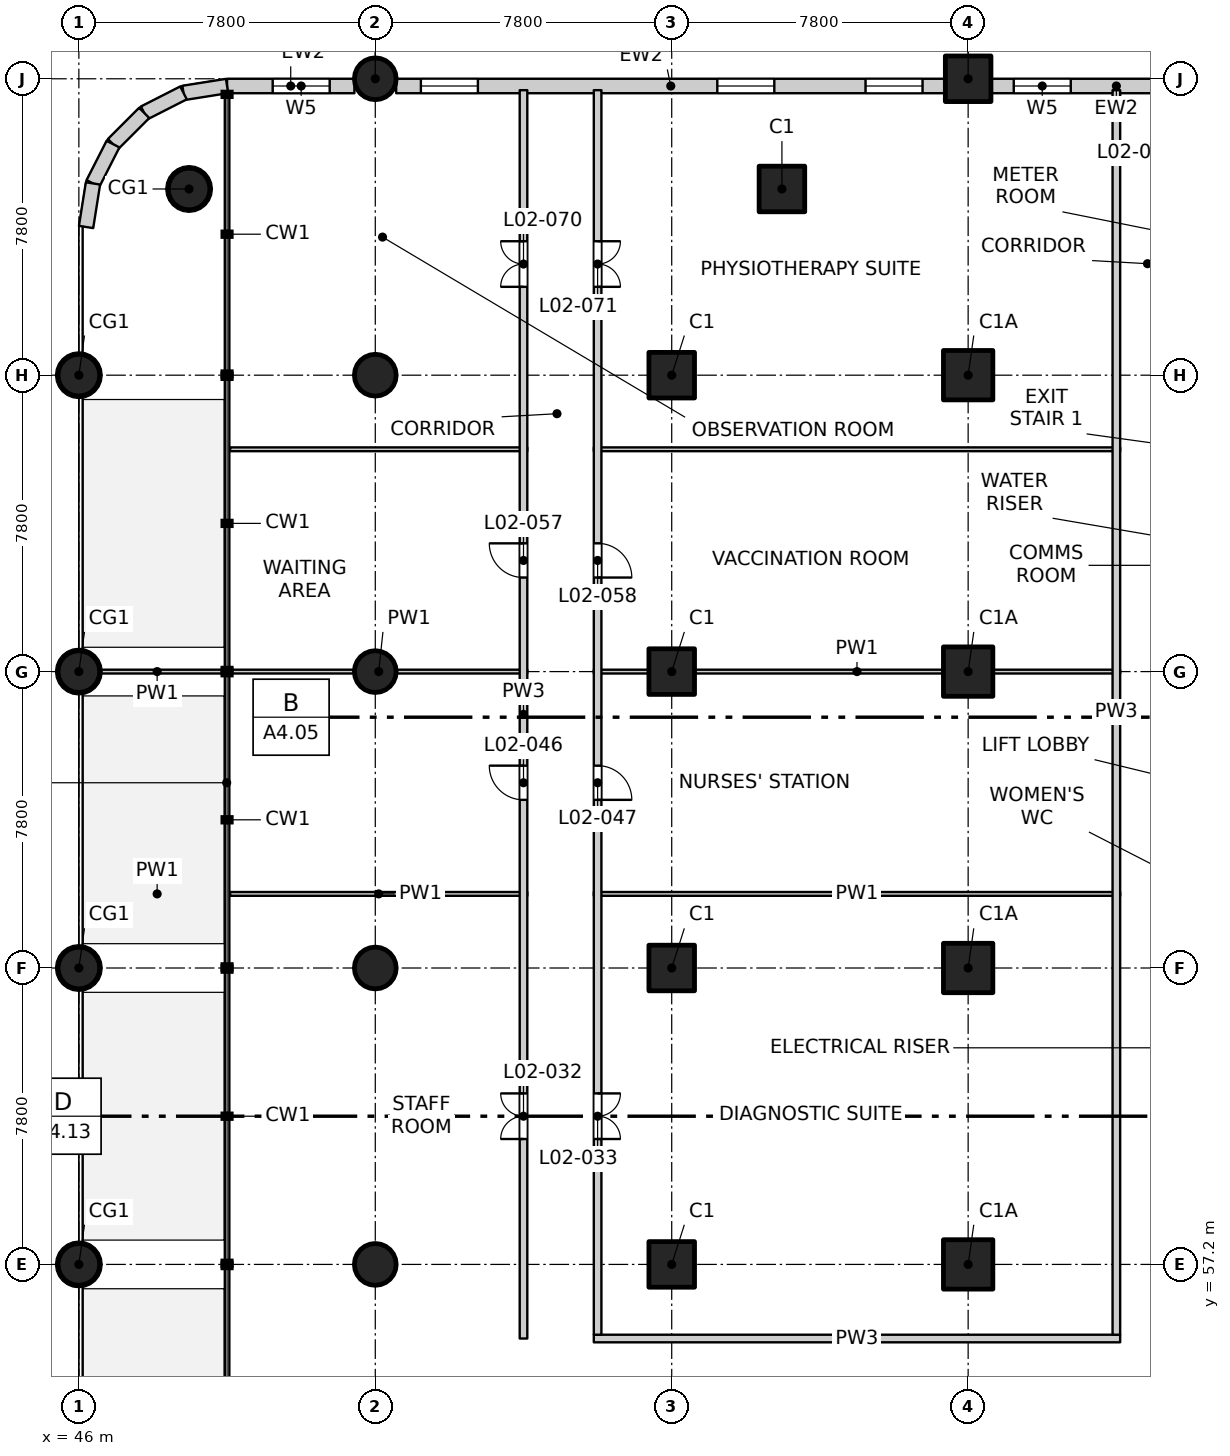
"""IFC4 building model, lengths in metres.
Left out: names, types, materials, properties, quantities, classifications, styles, units other than length and angle.
Written with IfcOpenShell. Run it as: python <this file> out.ifc"""

import sys

from ifc_helpers import new_model, si_unit, direction, frame, frame_2d, origin, origin_2d, place, context, subcontext, project, spatial, rectangle, circle, extrude, element, fill, save


model = new_model("IFC4")
c1 = context("Model", 3, precision=1e-05, world=origin(), true_north=direction((0.0, 1.0)))
c2 = subcontext(c1, "Body", "Model", "MODEL_VIEW")
j1 = project(units=[si_unit("LENGTHUNIT", "METRE"), si_unit("PLANEANGLEUNIT", "RADIAN")], contexts=[c1])
p1 = place(None, origin())
s1 = spatial("IfcSite", under=j1, at=p1, CompositionType="ELEMENT")
p2 = place(p1, origin())
s2 = spatial("IfcBuilding", under=s1, at=p2, CompositionType="ELEMENT")
p3 = place(p2, frame((0.0, 0.0, 10.5)))
s3 = spatial("IfcBuildingStorey", under=s2, at=p3, CompositionType="ELEMENT", Elevation=10.5)
for number, where, z_axis, x_axis in (
    (1, (64.5, 85.5, -0.3), (0.0, 0.0, 1.0), (1.0, 0.0, 0.0)),
    (2, (69.4, 88.4, -0.3), (0.0, 0.0, 1.0), (1.0, 0.0, 0.0)),
    (3, (61.6, 57.2, -0.3), (0.0, 0.0, 1.0), (1.0, 0.0, 0.0)),
    (4, (61.6, 65.0, -0.3), (0.0, 0.0, 1.0), (1.0, 0.0, 0.0)),
    (5, (61.6, 72.8, -0.3), (0.0, 0.0, 1.0), (1.0, 0.0, 0.0)),
    (6, (61.6, 80.6, -0.3), (0.0, 0.0, 1.0), (1.0, 0.0, 0.0)),
):
    element("IfcColumn", number, at=place(p3, frame(where, z_axis=z_axis, x_axis=x_axis)), inside=s3, PredefinedType="COLUMN", context=c2, shape_type="SweptSolid", body=[
        extrude(rectangle(XDim=1.2, YDim=1.2, at=origin_2d()), origin(), (0.0, 0.0, 1.0), 4.45),
    ])
for number, where, z_axis, x_axis in (
    (7, (69.4, 57.2, -0.3), (0.0, 0.0, 1.0), (1.0, 0.0, 0.0)),
    (8, (69.4, 65.0, -0.3), (0.0, 0.0, 1.0), (1.0, 0.0, 0.0)),
    (9, (69.4, 72.8, -0.3), (0.0, 0.0, 1.0), (1.0, 0.0, 0.0)),
    (10, (69.4, 80.6, -0.3), (0.0, 0.0, 1.0), (1.0, 0.0, 0.0)),
):
    element("IfcColumn", number, at=place(p3, frame(where, z_axis=z_axis, x_axis=x_axis)), inside=s3, PredefinedType="COLUMN", context=c2, shape_type="SweptSolid", body=[
        extrude(rectangle(XDim=1.3, YDim=1.3, at=origin_2d()), origin(), (0.0, 0.0, 1.0), 4.45),
    ])
for number, where, z_axis, x_axis in (
    (11, (46.0, 57.2, -0.3), (0.0, 0.0, 1.0), (1.0, 0.0, 0.0)),
    (12, (46.0, 65.0, -0.3), (0.0, 0.0, 1.0), (1.0, 0.0, 0.0)),
    (13, (46.0, 72.8, -0.3), (0.0, 0.0, 1.0), (1.0, 0.0, 0.0)),
    (14, (46.0, 80.6, -0.3), (0.0, 0.0, 1.0), (1.0, 0.0, 0.0)),
    (15, (48.9, 85.5, -0.3), (0.0, 0.0, 1.0), (1.0, 0.0, 0.0)),
    (16, (53.8, 57.2, -0.3), (0.0, 0.0, 1.0), (1.0, 0.0, 0.0)),
    (17, (53.8, 65.0, -0.3), (0.0, 0.0, 1.0), (1.0, 0.0, 0.0)),
    (18, (53.8, 72.8, -0.3), (0.0, 0.0, 1.0), (1.0, 0.0, 0.0)),
    (19, (53.8, 80.6, -0.3), (0.0, 0.0, 1.0), (1.0, 0.0, 0.0)),
    (20, (53.8, 88.4, -0.3), (0.0, 0.0, 1.0), (1.0, 0.0, 0.0)),
):
    element("IfcColumn", number, at=place(p3, frame(where, z_axis=z_axis, x_axis=x_axis)), inside=s3, PredefinedType="COLUMN", context=c2, shape_type="SweptSolid", body=[
        extrude(circle(Radius=0.55, at=origin_2d()), origin(), (0.0, 0.0, 1.0), 4.45),
    ])
p4 = place(p3, frame((49.9, 88.21, 0.0), z_axis=(0.0, 0.0, 1.0), x_axis=(1.0, 0.0, 0.0)))
e21 = element("IfcWall", 21, at=p4, inside=s3, PredefinedType="SOLIDWALL", context=c2, shape_type="SweptSolid", body=[
    extrude(rectangle(XDim=3.35, YDim=0.38, at=frame_2d((1.675, 0.0))), origin(), (0.0, 0.0, 1.0), 3.7),
])
p5 = place(p4, frame((1.2, 0.0, 0.9)))
e22 = element("IfcOpeningElement", 22, at=p5, cuts=e21, PredefinedType="OPENING", context=c2, shape_type="SweptSolid", body=[
    extrude(rectangle(XDim=1.5, YDim=1.5, at=frame_2d((0.75, 0.75))), frame((0.0, 0.2, 0.0), z_axis=(0.0, -1.0, 0.0), x_axis=(1.0, 0.0, 0.0)), (0.0, 0.0, 1.0), 0.4),
])
p6 = place(p3, frame((54.35, 88.21, 0.0), z_axis=(0.0, 0.0, 1.0), x_axis=(1.0, 0.0, 0.0)))
e23 = element("IfcWall", 23, at=p6, inside=s3, PredefinedType="SOLIDWALL", context=c2, shape_type="SweptSolid", body=[
    extrude(rectangle(XDim=14.45, YDim=0.38, at=frame_2d((7.225, 0.0))), origin(), (0.0, 0.0, 1.0), 3.7),
])
p7 = place(p6, frame((0.65, 0.0, 0.9)))
e24 = element("IfcOpeningElement", 24, at=p7, cuts=e23, PredefinedType="OPENING", context=c2, shape_type="SweptSolid", body=[
    extrude(rectangle(XDim=1.5, YDim=1.5, at=frame_2d((0.75, 0.75))), frame((0.0, 0.2, 0.0), z_axis=(0.0, -1.0, 0.0), x_axis=(1.0, 0.0, 0.0)), (0.0, 0.0, 1.0), 0.4),
])
p8 = place(p6, frame((8.45, 0.0, 0.9)))
e25 = element("IfcOpeningElement", 25, at=p8, cuts=e23, PredefinedType="OPENING", context=c2, shape_type="SweptSolid", body=[
    extrude(rectangle(XDim=1.5, YDim=1.5, at=frame_2d((0.75, 0.75))), frame((0.0, 0.2, 0.0), z_axis=(0.0, -1.0, 0.0), x_axis=(1.0, 0.0, 0.0)), (0.0, 0.0, 1.0), 0.4),
])
p9 = place(p6, frame((12.35, 0.0, 0.9)))
e26 = element("IfcOpeningElement", 26, at=p9, cuts=e23, PredefinedType="OPENING", context=c2, shape_type="SweptSolid", body=[
    extrude(rectangle(XDim=1.5, YDim=1.5, at=frame_2d((0.75, 0.75))), frame((0.0, 0.2, 0.0), z_axis=(0.0, -1.0, 0.0), x_axis=(1.0, 0.0, 0.0)), (0.0, 0.0, 1.0), 0.4),
])
p10 = place(p3, frame((70.0, 88.21, 0.0), z_axis=(0.0, 0.0, 1.0), x_axis=(1.0, 0.0, 0.0)))
e27 = element("IfcWall", 27, at=p10, inside=s3, PredefinedType="SOLIDWALL", context=c2, shape_type="SweptSolid", body=[
    extrude(rectangle(XDim=6.6, YDim=0.38, at=frame_2d((3.3, 0.0))), origin(), (0.0, 0.0, 1.0), 3.7),
])
p11 = place(p10, frame((0.6, 0.0, 0.9)))
e28 = element("IfcOpeningElement", 28, at=p11, cuts=e27, PredefinedType="OPENING", context=c2, shape_type="SweptSolid", body=[
    extrude(rectangle(XDim=1.5, YDim=1.5, at=frame_2d((0.75, 0.75))), frame((0.0, 0.2, 0.0), z_axis=(0.0, -1.0, 0.0), x_axis=(1.0, 0.0, 0.0)), (0.0, 0.0, 1.0), 0.4),
])
p12 = place(p3, frame((49.9, 88.21, 0.0), z_axis=(0.0, 0.0, 1.0), x_axis=(-0.987675821844, -0.156513484867, 0.0)))
e29 = element("IfcWall", 29, at=p12, inside=s3, PredefinedType="SOLIDWALL", context=c2, shape_type="SweptSolid", body=[
    extrude(rectangle(XDim=1.161, YDim=0.38, at=frame_2d((0.58, 0.0))), origin(), (0.0, 0.0, 1.0), 3.7),
])
for number, where, z_axis, x_axis in (
    (30, (48.754, 88.028, 0.0), (0.0, 0.0, 1.0), (-0.891, -0.454, 0.0)),
    (31, (47.719, 87.501, 0.0), (0.0, 0.0, 1.0), (-0.707, -0.707, 0.0)),
):
    element("IfcWall", number, at=place(p3, frame(where, z_axis=z_axis, x_axis=x_axis)), inside=s3, PredefinedType="SOLIDWALL", context=c2, shape_type="SweptSolid", body=[
        extrude(rectangle(XDim=1.161, YDim=0.38, at=frame_2d((0.581, 0.0))), origin(), (0.0, 0.0, 1.0), 3.7),
    ])
p13 = place(p3, frame((46.898, 86.681, 0.0), z_axis=(0.0, 0.0, 1.0), x_axis=(-0.453932083539, -0.891036286317, 0.0)))
e32 = element("IfcWall", 32, at=p13, inside=s3, PredefinedType="SOLIDWALL", context=c2, shape_type="SweptSolid", body=[
    extrude(rectangle(XDim=1.161, YDim=0.38, at=frame_2d((0.58, 0.0))), origin(), (0.0, 0.0, 1.0), 3.7),
])
p14 = place(p3, frame((46.372, 85.646, 0.0), z_axis=(0.0, 0.0, 1.0), x_axis=(-0.156480971952, -0.987680973502, 0.0)))
e33 = element("IfcWall", 33, at=p14, inside=s3, PredefinedType="SOLIDWALL", context=c2, shape_type="SweptSolid", body=[
    extrude(rectangle(XDim=1.161, YDim=0.38, at=frame_2d((0.581, 0.0))), origin(), (0.0, 0.0, 1.0), 3.7),
])
p15 = place(p3, frame((59.55, 55.25, 0.0), z_axis=(0.0, 0.0, 1.0), x_axis=(1.0, 0.0, 0.0)))
e34 = element("IfcWall", 34, at=p15, inside=s3, PredefinedType="PARTITIONING", context=c2, shape_type="SweptSolid", body=[
    extrude(rectangle(XDim=13.85, YDim=0.2, at=frame_2d((6.925, 0.0))), origin(), (0.0, 0.0, 1.0), 4.15),
])
p16 = place(p3, frame((46.3, 66.95, 0.0), z_axis=(0.0, 0.0, 1.0), x_axis=(1.0, 0.0, 0.0)))
e35 = element("IfcWall", 35, at=p16, inside=s3, PredefinedType="PARTITIONING", context=c2, shape_type="SweptSolid", body=[
    extrude(rectangle(XDim=3.52, YDim=0.1, at=frame_2d((1.76, 0.0))), origin(), (0.0, 0.0, 1.0), 4.15),
])
p17 = place(p3, frame((49.98, 66.95, 0.0), z_axis=(0.0, 0.0, 1.0), x_axis=(1.0, 0.0, 0.0)))
e36 = element("IfcWall", 36, at=p17, inside=s3, PredefinedType="PARTITIONING", context=c2, shape_type="SweptSolid", body=[
    extrude(rectangle(XDim=7.82, YDim=0.1, at=frame_2d((3.91, 0.0))), origin(), (0.0, 0.0, 1.0), 4.15),
])
p18 = place(p3, frame((59.55, 66.95, 0.0), z_axis=(0.0, 0.0, 1.0), x_axis=(1.0, 0.0, 0.0)))
e37 = element("IfcWall", 37, at=p18, inside=s3, PredefinedType="PARTITIONING", context=c2, shape_type="SweptSolid", body=[
    extrude(rectangle(XDim=13.85, YDim=0.1, at=frame_2d((6.925, 0.0))), origin(), (0.0, 0.0, 1.0), 4.15),
])
p19 = place(p3, frame((46.3, 72.8, 0.0), z_axis=(0.0, 0.0, 1.0), x_axis=(1.0, 0.0, 0.0)))
e38 = element("IfcWall", 38, at=p19, inside=s3, PredefinedType="PARTITIONING", context=c2, shape_type="SweptSolid", body=[
    extrude(rectangle(XDim=3.52, YDim=0.1, at=frame_2d((1.76, 0.0))), origin(), (0.0, 0.0, 1.0), 4.15),
])
p20 = place(p3, frame((49.98, 72.8, 0.0), z_axis=(0.0, 0.0, 1.0), x_axis=(1.0, 0.0, 0.0)))
e39 = element("IfcWall", 39, at=p20, inside=s3, PredefinedType="PARTITIONING", context=c2, shape_type="SweptSolid", body=[
    extrude(rectangle(XDim=7.82, YDim=0.1, at=frame_2d((3.91, 0.0))), origin(), (0.0, 0.0, 1.0), 4.15),
])
p21 = place(p3, frame((59.55, 72.8, 0.0), z_axis=(0.0, 0.0, 1.0), x_axis=(1.0, 0.0, 0.0)))
e40 = element("IfcWall", 40, at=p21, inside=s3, PredefinedType="PARTITIONING", context=c2, shape_type="SweptSolid", body=[
    extrude(rectangle(XDim=13.85, YDim=0.1, at=frame_2d((6.925, 0.0))), origin(), (0.0, 0.0, 1.0), 4.15),
])
p22 = place(p3, frame((46.3, 78.65, 0.0), z_axis=(0.0, 0.0, 1.0), x_axis=(1.0, 0.0, 0.0)))
e41 = element("IfcWall", 41, at=p22, inside=s3, PredefinedType="PARTITIONING", context=c2, shape_type="SweptSolid", body=[
    extrude(rectangle(XDim=3.52, YDim=0.1, at=frame_2d((1.76, 0.0))), origin(), (0.0, 0.0, 1.0), 4.15),
])
p23 = place(p3, frame((49.98, 78.65, 0.0), z_axis=(0.0, 0.0, 1.0), x_axis=(1.0, 0.0, 0.0)))
e42 = element("IfcWall", 42, at=p23, inside=s3, PredefinedType="PARTITIONING", context=c2, shape_type="SweptSolid", body=[
    extrude(rectangle(XDim=7.82, YDim=0.1, at=frame_2d((3.91, 0.0))), origin(), (0.0, 0.0, 1.0), 4.15),
])
p24 = place(p3, frame((59.55, 78.65, 0.0), z_axis=(0.0, 0.0, 1.0), x_axis=(1.0, 0.0, 0.0)))
e43 = element("IfcWall", 43, at=p24, inside=s3, PredefinedType="PARTITIONING", context=c2, shape_type="SweptSolid", body=[
    extrude(rectangle(XDim=13.85, YDim=0.1, at=frame_2d((6.925, 0.0))), origin(), (0.0, 0.0, 1.0), 4.15),
])
p25 = place(p3, frame((57.7, 55.25, 0.0), z_axis=(0.0, 0.0, 1.0), x_axis=(0.0, 1.0, 0.0)))
e44 = element("IfcWall", 44, at=p25, inside=s3, PredefinedType="PARTITIONING", context=c2, shape_type="SweptSolid", body=[
    extrude(rectangle(XDim=32.85, YDim=0.2, at=frame_2d((16.425, 0.0))), origin(), (0.0, 0.0, 1.0), 4.15),
])
p26 = place(p25, frame((5.25, 0.0, 0.0)))
e45 = element("IfcOpeningElement", 45, at=p26, cuts=e44, PredefinedType="OPENING", context=c2, shape_type="SweptSolid", body=[
    extrude(rectangle(XDim=1.2, YDim=2.1, at=frame_2d((0.6, 1.05))), frame((0.0, 0.11, 0.0), z_axis=(0.0, -1.0, 0.0), x_axis=(1.0, 0.0, 0.0)), (0.0, 0.0, 1.0), 0.22),
])
p27 = place(p25, frame((14.175, 0.0, 0.0)))
e46 = element("IfcOpeningElement", 46, at=p27, cuts=e44, PredefinedType="OPENING", context=c2, shape_type="SweptSolid", body=[
    extrude(rectangle(XDim=0.9, YDim=2.1, at=frame_2d((0.45, 1.05))), frame((0.0, 0.11, 0.0), z_axis=(0.0, -1.0, 0.0), x_axis=(1.0, 0.0, 0.0)), (0.0, 0.0, 1.0), 0.22),
])
p28 = place(p25, frame((20.025, 0.0, 0.0)))
e47 = element("IfcOpeningElement", 47, at=p28, cuts=e44, PredefinedType="OPENING", context=c2, shape_type="SweptSolid", body=[
    extrude(rectangle(XDim=0.9, YDim=2.1, at=frame_2d((0.45, 1.05))), frame((0.0, 0.11, 0.0), z_axis=(0.0, -1.0, 0.0), x_axis=(1.0, 0.0, 0.0)), (0.0, 0.0, 1.0), 0.22),
])
p29 = place(p25, frame((27.675, 0.0, 0.0)))
e48 = element("IfcOpeningElement", 48, at=p29, cuts=e44, PredefinedType="OPENING", context=c2, shape_type="SweptSolid", body=[
    extrude(rectangle(XDim=1.2, YDim=2.1, at=frame_2d((0.6, 1.05))), frame((0.0, 0.11, 0.0), z_axis=(0.0, -1.0, 0.0), x_axis=(1.0, 0.0, 0.0)), (0.0, 0.0, 1.0), 0.22),
])
p30 = place(p3, frame((59.65, 55.35, 0.0), z_axis=(0.0, 0.0, 1.0), x_axis=(0.0, 1.0, 0.0)))
e49 = element("IfcWall", 49, at=p30, inside=s3, PredefinedType="PARTITIONING", context=c2, shape_type="SweptSolid", body=[
    extrude(rectangle(XDim=32.75, YDim=0.2, at=frame_2d((16.375, 0.0))), origin(), (0.0, 0.0, 1.0), 4.15),
])
p31 = place(p30, frame((5.15, 0.0, 0.0)))
e50 = element("IfcOpeningElement", 50, at=p31, cuts=e49, PredefinedType="OPENING", context=c2, shape_type="SweptSolid", body=[
    extrude(rectangle(XDim=1.2, YDim=2.1, at=frame_2d((0.6, 1.05))), frame((0.0, 0.11, 0.0), z_axis=(0.0, -1.0, 0.0), x_axis=(1.0, 0.0, 0.0)), (0.0, 0.0, 1.0), 0.22),
])
p32 = place(p30, frame((14.075, 0.0, 0.0)))
e51 = element("IfcOpeningElement", 51, at=p32, cuts=e49, PredefinedType="OPENING", context=c2, shape_type="SweptSolid", body=[
    extrude(rectangle(XDim=0.9, YDim=2.1, at=frame_2d((0.45, 1.05))), frame((0.0, 0.11, 0.0), z_axis=(0.0, -1.0, 0.0), x_axis=(1.0, 0.0, 0.0)), (0.0, 0.0, 1.0), 0.22),
])
p33 = place(p30, frame((19.925, 0.0, 0.0)))
e52 = element("IfcOpeningElement", 52, at=p33, cuts=e49, PredefinedType="OPENING", context=c2, shape_type="SweptSolid", body=[
    extrude(rectangle(XDim=0.9, YDim=2.1, at=frame_2d((0.45, 1.05))), frame((0.0, 0.11, 0.0), z_axis=(0.0, -1.0, 0.0), x_axis=(1.0, 0.0, 0.0)), (0.0, 0.0, 1.0), 0.22),
])
p34 = place(p30, frame((27.575, 0.0, 0.0)))
e53 = element("IfcOpeningElement", 53, at=p34, cuts=e49, PredefinedType="OPENING", context=c2, shape_type="SweptSolid", body=[
    extrude(rectangle(XDim=1.2, YDim=2.1, at=frame_2d((0.6, 1.05))), frame((0.0, 0.11, 0.0), z_axis=(0.0, -1.0, 0.0), x_axis=(1.0, 0.0, 0.0)), (0.0, 0.0, 1.0), 0.22),
])
p35 = place(p3, frame((73.3, 55.35, 0.0), z_axis=(0.0, 0.0, 1.0), x_axis=(0.0, 1.0, 0.0)))
e54 = element("IfcWall", 54, at=p35, inside=s3, PredefinedType="PARTITIONING", context=c2, shape_type="SweptSolid", body=[
    extrude(rectangle(XDim=32.75, YDim=0.2, at=frame_2d((16.375, 0.0))), origin(), (0.0, 0.0, 1.0), 4.15),
])
p36 = place(p5, origin())
e55 = element("IfcWindow", 55, at=p36, inside=s3, PartitioningType="SINGLE_PANEL", PredefinedType="WINDOW", context=c2, shape_type="SweptSolid", body=[
    extrude(rectangle(XDim=1.5, YDim=1.5, at=frame_2d((0.75, 0.75))), frame((0.0, 0.03, 0.0), z_axis=(0.0, -1.0, 0.0), x_axis=(1.0, 0.0, 0.0)), (0.0, 0.0, 1.0), 0.06),
])
fill(e22, e55)
p37 = place(p7, origin())
e56 = element("IfcWindow", 56, at=p37, inside=s3, PartitioningType="SINGLE_PANEL", PredefinedType="WINDOW", context=c2, shape_type="SweptSolid", body=[
    extrude(rectangle(XDim=1.5, YDim=1.5, at=frame_2d((0.75, 0.75))), frame((0.0, 0.03, 0.0), z_axis=(0.0, -1.0, 0.0), x_axis=(1.0, 0.0, 0.0)), (0.0, 0.0, 1.0), 0.06),
])
fill(e24, e56)
p38 = place(p8, origin())
e57 = element("IfcWindow", 57, at=p38, inside=s3, PartitioningType="SINGLE_PANEL", PredefinedType="WINDOW", context=c2, shape_type="SweptSolid", body=[
    extrude(rectangle(XDim=1.5, YDim=1.5, at=frame_2d((0.75, 0.75))), frame((0.0, 0.03, 0.0), z_axis=(0.0, -1.0, 0.0), x_axis=(1.0, 0.0, 0.0)), (0.0, 0.0, 1.0), 0.06),
])
fill(e25, e57)
p39 = place(p9, origin())
e58 = element("IfcWindow", 58, at=p39, inside=s3, PartitioningType="SINGLE_PANEL", PredefinedType="WINDOW", context=c2, shape_type="SweptSolid", body=[
    extrude(rectangle(XDim=1.5, YDim=1.5, at=frame_2d((0.75, 0.75))), frame((0.0, 0.03, 0.0), z_axis=(0.0, -1.0, 0.0), x_axis=(1.0, 0.0, 0.0)), (0.0, 0.0, 1.0), 0.06),
])
fill(e26, e58)
p40 = place(p11, origin())
e59 = element("IfcWindow", 59, at=p40, inside=s3, PartitioningType="SINGLE_PANEL", PredefinedType="WINDOW", context=c2, shape_type="SweptSolid", body=[
    extrude(rectangle(XDim=1.5, YDim=1.5, at=frame_2d((0.75, 0.75))), frame((0.0, 0.03, 0.0), z_axis=(0.0, -1.0, 0.0), x_axis=(1.0, 0.0, 0.0)), (0.0, 0.0, 1.0), 0.06),
])
fill(e28, e59)
p41 = place(p26, origin())
e60 = element("IfcDoor", 60, at=p41, inside=s3, OperationType="DOUBLE_DOOR_SINGLE_SWING", PredefinedType="DOOR", context=c2, shape_type="SweptSolid", body=[
    extrude(rectangle(XDim=1.2, YDim=2.1, at=frame_2d((0.6, 1.05))), frame((0.0, 0.025, 0.0), z_axis=(0.0, -1.0, 0.0), x_axis=(1.0, 0.0, 0.0)), (0.0, 0.0, 1.0), 0.05),
])
fill(e45, e60)
p42 = place(p31, origin())
e61 = element("IfcDoor", 61, at=p42, inside=s3, OperationType="DOUBLE_DOOR_SINGLE_SWING", PredefinedType="DOOR", context=c2, shape_type="SweptSolid", body=[
    extrude(rectangle(XDim=1.2, YDim=2.1, at=frame_2d((0.6, 1.05))), frame((0.0, 0.025, 0.0), z_axis=(0.0, -1.0, 0.0), x_axis=(1.0, 0.0, 0.0)), (0.0, 0.0, 1.0), 0.05),
])
fill(e50, e61)
p43 = place(p27, origin())
e62 = element("IfcDoor", 62, at=p43, inside=s3, OperationType="SINGLE_SWING_RIGHT", PredefinedType="DOOR", context=c2, shape_type="SweptSolid", body=[
    extrude(rectangle(XDim=0.9, YDim=2.1, at=frame_2d((0.45, 1.05))), frame((0.0, 0.025, 0.0), z_axis=(0.0, -1.0, 0.0), x_axis=(1.0, 0.0, 0.0)), (0.0, 0.0, 1.0), 0.05),
])
fill(e46, e62)
p44 = place(p32, origin())
e63 = element("IfcDoor", 63, at=p44, inside=s3, OperationType="SINGLE_SWING_RIGHT", PredefinedType="DOOR", context=c2, shape_type="SweptSolid", body=[
    extrude(rectangle(XDim=0.9, YDim=2.1, at=frame_2d((0.45, 1.05))), frame((0.0, 0.025, 0.0), z_axis=(0.0, -1.0, 0.0), x_axis=(1.0, 0.0, 0.0)), (0.0, 0.0, 1.0), 0.05),
])
fill(e51, e63)
p45 = place(p28, origin())
e64 = element("IfcDoor", 64, at=p45, inside=s3, OperationType="SINGLE_SWING_RIGHT", PredefinedType="DOOR", context=c2, shape_type="SweptSolid", body=[
    extrude(rectangle(XDim=0.9, YDim=2.1, at=frame_2d((0.45, 1.05))), frame((0.0, 0.025, 0.0), z_axis=(0.0, -1.0, 0.0), x_axis=(1.0, 0.0, 0.0)), (0.0, 0.0, 1.0), 0.05),
])
fill(e47, e64)
p46 = place(p33, origin())
e65 = element("IfcDoor", 65, at=p46, inside=s3, OperationType="SINGLE_SWING_RIGHT", PredefinedType="DOOR", context=c2, shape_type="SweptSolid", body=[
    extrude(rectangle(XDim=0.9, YDim=2.1, at=frame_2d((0.45, 1.05))), frame((0.0, 0.025, 0.0), z_axis=(0.0, -1.0, 0.0), x_axis=(1.0, 0.0, 0.0)), (0.0, 0.0, 1.0), 0.05),
])
fill(e52, e65)
p47 = place(p29, origin())
e66 = element("IfcDoor", 66, at=p47, inside=s3, OperationType="DOUBLE_DOOR_SINGLE_SWING", PredefinedType="DOOR", context=c2, shape_type="SweptSolid", body=[
    extrude(rectangle(XDim=1.2, YDim=2.1, at=frame_2d((0.6, 1.05))), frame((0.0, 0.025, 0.0), z_axis=(0.0, -1.0, 0.0), x_axis=(1.0, 0.0, 0.0)), (0.0, 0.0, 1.0), 0.05),
])
fill(e48, e66)
p48 = place(p34, origin())
e67 = element("IfcDoor", 67, at=p48, inside=s3, OperationType="DOUBLE_DOOR_SINGLE_SWING", PredefinedType="DOOR", context=c2, shape_type="SweptSolid", body=[
    extrude(rectangle(XDim=1.2, YDim=2.1, at=frame_2d((0.6, 1.05))), frame((0.0, 0.025, 0.0), z_axis=(0.0, -1.0, 0.0), x_axis=(1.0, 0.0, 0.0)), (0.0, 0.0, 1.0), 0.05),
])
fill(e53, e67)
save(model, sys.argv[1])
